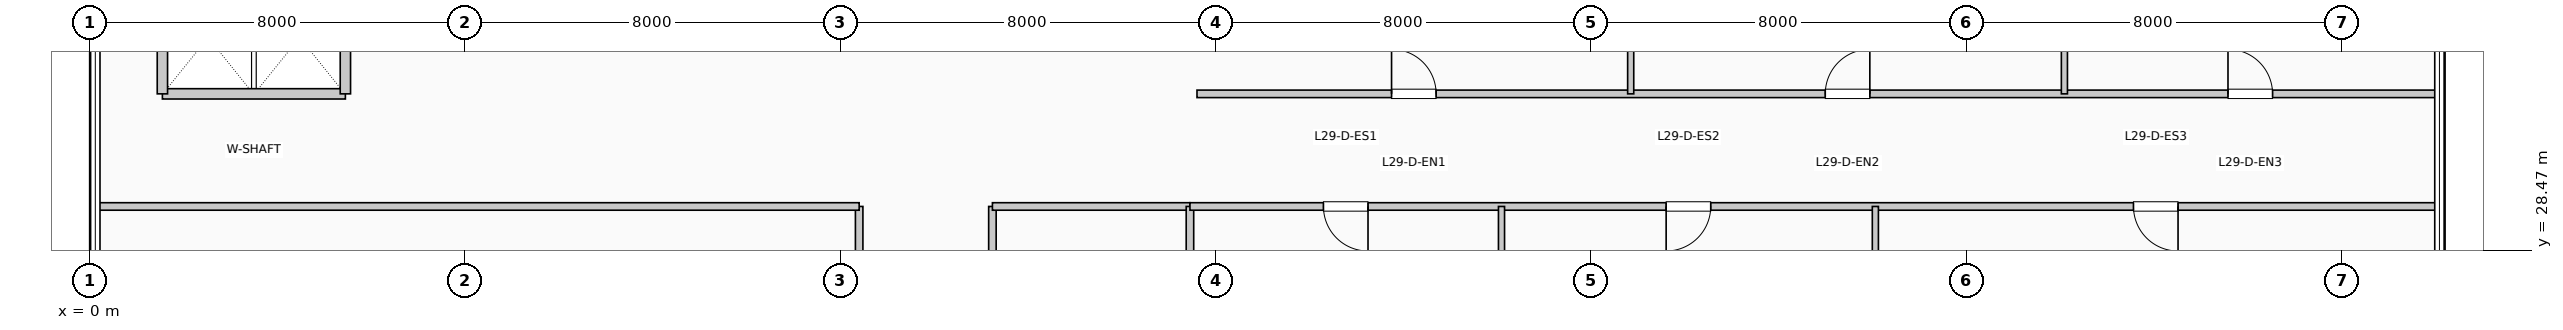
"""IFC4 building model, lengths in metres.
Left out: names, types, materials, properties, quantities, classifications, styles, units other than length and angle.
Written with IfcOpenShell. Run it as: python <this file> out.ifc"""

import sys

from ifc_helpers import new_model, si_unit, direction, frame, frame_2d, origin, place, context, subcontext, project, spatial, rectangle, extrude, element, fill, save


model = new_model("IFC4")
c1 = context("Model", 3, precision=1e-05, world=origin(), true_north=direction((0.0, 1.0)))
c2 = subcontext(c1, "Body", "Model", "MODEL_VIEW")
j1 = project(units=[si_unit("LENGTHUNIT", "METRE"), si_unit("PLANEANGLEUNIT", "RADIAN")], contexts=[c1])
p1 = place(None, origin())
s1 = spatial("IfcSite", under=j1, at=p1, CompositionType="ELEMENT")
p2 = place(p1, origin())
s2 = spatial("IfcBuilding", under=s1, at=p2, CompositionType="ELEMENT")
p3 = place(p2, frame((0.0, 0.0, 122.43)))
s3 = spatial("IfcBuildingStorey", under=s2, at=p3, CompositionType="ELEMENT", Elevation=122.43)
p4 = place(p3, frame((1.55, 31.8, 0.0), z_axis=(0.0, 0.0, 1.0), x_axis=(1.0, 0.0, 0.0)))
e1 = element("IfcWall", 1, at=p4, inside=s3, PredefinedType="PARTITIONING", context=c2, shape_type="SweptSolid", body=[
    extrude(rectangle(XDim=3.9, YDim=0.22, at=frame_2d((1.95, 0.0))), origin(), (0.0, 0.0, 1.0), 3.71),
])
for number, where, z_axis, x_axis in (
    (2, (1.55, 31.8, 0.0), (0.0, 0.0, 1.0), (0.0, 1.0, 0.0)),
    (3, (5.45, 31.8, 0.0), (0.0, 0.0, 1.0), (0.0, 1.0, 0.0)),
):
    element("IfcWall", number, at=place(p3, frame(where, z_axis=z_axis, x_axis=x_axis)), inside=s3, PredefinedType="PARTITIONING", context=c2, shape_type="SweptSolid", body=[
        extrude(rectangle(XDim=2.38, YDim=0.22, at=frame_2d((1.19, 0.0))), origin(), (0.0, 0.0, 1.0), 3.71),
    ])
p5 = place(p3, frame((16.4, 7.2, 0.0), z_axis=(0.0, 0.0, 1.0), x_axis=(0.0, 1.0, 0.0)))
e4 = element("IfcWall", 4, at=p5, inside=s3, PredefinedType="PARTITIONING", context=c2, shape_type="SweptSolid", body=[
    extrude(rectangle(XDim=22.2, YDim=0.16, at=frame_2d((11.1, 0.0))), origin(), (0.0, 0.0, 1.0), 3.71),
])
p6 = place(p5, frame((6.247, 0.0, 0.0), z_axis=(0.0, 0.0, 1.0), x_axis=(-1.0, 0.0, 0.0)))
e5 = element("IfcOpeningElement", 5, at=p6, cuts=e4, PredefinedType="OPENING", context=c2, shape_type="SweptSolid", body=[
    extrude(rectangle(XDim=0.95, YDim=2.15, at=frame_2d((0.475, 1.075))), frame((0.0, 0.09, 0.0), z_axis=(0.0, -1.0, 0.0), x_axis=(1.0, 0.0, 0.0)), (0.0, 0.0, 1.0), 0.18),
])
p7 = place(p5, frame((17.347, 0.0, 0.0), z_axis=(0.0, 0.0, 1.0), x_axis=(-1.0, 0.0, 0.0)))
e6 = element("IfcOpeningElement", 6, at=p7, cuts=e4, PredefinedType="OPENING", context=c2, shape_type="SweptSolid", body=[
    extrude(rectangle(XDim=0.95, YDim=2.15, at=frame_2d((0.475, 1.075))), frame((0.0, 0.09, 0.0), z_axis=(0.0, -1.0, 0.0), x_axis=(1.0, 0.0, 0.0)), (0.0, 0.0, 1.0), 0.18),
])
p8 = place(p3, frame((19.24, 7.2, 0.0), z_axis=(0.0, 0.0, 1.0), x_axis=(0.0, 1.0, 0.0)))
e7 = element("IfcWall", 7, at=p8, inside=s3, PredefinedType="PARTITIONING", context=c2, shape_type="SweptSolid", body=[
    extrude(rectangle(XDim=22.2, YDim=0.16, at=frame_2d((11.1, 0.0))), origin(), (0.0, 0.0, 1.0), 3.71),
])
p9 = place(p8, frame((4.52, 0.0, 0.0)))
e8 = element("IfcOpeningElement", 8, at=p9, cuts=e7, PredefinedType="OPENING", context=c2, shape_type="SweptSolid", body=[
    extrude(rectangle(XDim=0.95, YDim=2.15, at=frame_2d((0.475, 1.075))), frame((0.0, 0.09, 0.0), z_axis=(0.0, -1.0, 0.0), x_axis=(1.0, 0.0, 0.0)), (0.0, 0.0, 1.0), 0.18),
])
p10 = place(p8, frame((15.62, 0.0, 0.0)))
e9 = element("IfcOpeningElement", 9, at=p10, cuts=e7, PredefinedType="OPENING", context=c2, shape_type="SweptSolid", body=[
    extrude(rectangle(XDim=0.95, YDim=2.15, at=frame_2d((0.475, 1.075))), frame((0.0, 0.09, 0.0), z_axis=(0.0, -1.0, 0.0), x_axis=(1.0, 0.0, 0.0)), (0.0, 0.0, 1.0), 0.18),
])
p11 = place(p3, frame((0.19, 29.4, 0.0), z_axis=(0.0, 0.0, 1.0), x_axis=(1.0, 0.0, 0.0)))
e10 = element("IfcWall", 10, at=p11, inside=s3, PredefinedType="PARTITIONING", context=c2, shape_type="SweptSolid", body=[
    extrude(rectangle(XDim=16.21, YDim=0.16, at=frame_2d((8.105, 0.0))), origin(), (0.0, 0.0, 1.0), 3.365),
])
p12 = place(p3, frame((19.24, 29.4, 0.0), z_axis=(0.0, 0.0, 1.0), x_axis=(1.0, 0.0, 0.0)))
e11 = element("IfcWall", 11, at=p12, inside=s3, PredefinedType="PARTITIONING", context=c2, shape_type="SweptSolid", body=[
    extrude(rectangle(XDim=4.21, YDim=0.16, at=frame_2d((2.105, 0.0))), origin(), (0.0, 0.0, 1.0), 3.71),
])
p13 = place(p3, frame((23.45, 0.19, 0.0), z_axis=(0.0, 0.0, 1.0), x_axis=(0.0, 1.0, 0.0)))
e12 = element("IfcWall", 12, at=p13, inside=s3, PredefinedType="PARTITIONING", context=c2, shape_type="SweptSolid", body=[
    extrude(rectangle(XDim=29.21, YDim=0.16, at=frame_2d((14.605, 0.0))), origin(), (0.0, 0.0, 1.0), 3.045),
])
p14 = place(p3, frame((23.45, 29.4, 0.0), z_axis=(0.0, 0.0, 1.0), x_axis=(1.0, 0.0, 0.0)))
e13 = element("IfcWall", 13, at=p14, inside=s3, PredefinedType="PARTITIONING", context=c2, shape_type="SweptSolid", body=[
    extrude(rectangle(XDim=26.56, YDim=0.16, at=frame_2d((13.28, 0.0))), origin(), (0.0, 0.0, 1.0), 3.365),
])
p15 = place(p14, frame((3.795, 0.0, 0.0), z_axis=(0.0, 0.0, 1.0), x_axis=(-1.0, 0.0, 0.0)))
e14 = element("IfcOpeningElement", 14, at=p15, cuts=e13, PredefinedType="OPENING", context=c2, shape_type="SweptSolid", body=[
    extrude(rectangle(XDim=0.95, YDim=2.15, at=frame_2d((0.475, 1.075))), frame((0.0, 0.09, 0.0), z_axis=(0.0, -1.0, 0.0), x_axis=(1.0, 0.0, 0.0)), (0.0, 0.0, 1.0), 0.18),
])
p16 = place(p14, frame((11.099, 0.0, 0.0), z_axis=(0.0, 0.0, 1.0), x_axis=(-1.0, 0.0, 0.0)))
e15 = element("IfcOpeningElement", 15, at=p16, cuts=e13, PredefinedType="OPENING", context=c2, shape_type="SweptSolid", body=[
    extrude(rectangle(XDim=0.95, YDim=2.15, at=frame_2d((0.475, 1.075))), frame((0.0, 0.09, 0.0), z_axis=(0.0, -1.0, 0.0), x_axis=(1.0, 0.0, 0.0)), (0.0, 0.0, 1.0), 0.18),
])
p17 = place(p14, frame((21.059, 0.0, 0.0), z_axis=(0.0, 0.0, 1.0), x_axis=(-1.0, 0.0, 0.0)))
e16 = element("IfcOpeningElement", 16, at=p17, cuts=e13, PredefinedType="OPENING", context=c2, shape_type="SweptSolid", body=[
    extrude(rectangle(XDim=0.95, YDim=2.15, at=frame_2d((0.475, 1.075))), frame((0.0, 0.09, 0.0), z_axis=(0.0, -1.0, 0.0), x_axis=(1.0, 0.0, 0.0)), (0.0, 0.0, 1.0), 0.18),
])
p18 = place(p3, frame((23.6, 31.8, 0.0), z_axis=(0.0, 0.0, 1.0), x_axis=(1.0, 0.0, 0.0)))
e17 = element("IfcWall", 17, at=p18, inside=s3, PredefinedType="PARTITIONING", context=c2, shape_type="SweptSolid", body=[
    extrude(rectangle(XDim=26.41, YDim=0.16, at=frame_2d((13.205, 0.0))), origin(), (0.0, 0.0, 1.0), 3.71),
])
p19 = place(p18, frame((4.147, 0.0, 0.0)))
e18 = element("IfcOpeningElement", 18, at=p19, cuts=e17, PredefinedType="OPENING", context=c2, shape_type="SweptSolid", body=[
    extrude(rectangle(XDim=0.95, YDim=2.15, at=frame_2d((0.475, 1.075))), frame((0.0, 0.09, 0.0), z_axis=(0.0, -1.0, 0.0), x_axis=(1.0, 0.0, 0.0)), (0.0, 0.0, 1.0), 0.18),
])
p20 = place(p18, frame((13.39, 0.0, 0.0)))
e19 = element("IfcOpeningElement", 19, at=p20, cuts=e17, PredefinedType="OPENING", context=c2, shape_type="SweptSolid", body=[
    extrude(rectangle(XDim=0.95, YDim=2.15, at=frame_2d((0.475, 1.075))), frame((0.0, 0.09, 0.0), z_axis=(0.0, -1.0, 0.0), x_axis=(1.0, 0.0, 0.0)), (0.0, 0.0, 1.0), 0.18),
])
p21 = place(p18, frame((21.973, 0.0, 0.0)))
e20 = element("IfcOpeningElement", 20, at=p21, cuts=e17, PredefinedType="OPENING", context=c2, shape_type="SweptSolid", body=[
    extrude(rectangle(XDim=0.95, YDim=2.15, at=frame_2d((0.475, 1.075))), frame((0.0, 0.09, 0.0), z_axis=(0.0, -1.0, 0.0), x_axis=(1.0, 0.0, 0.0)), (0.0, 0.0, 1.0), 0.18),
])
for number, where, z_axis, x_axis in (
    (21, (30.09, 22.19, 0.0), (0.0, 0.0, 1.0), (0.0, 1.0, 0.0)),
    (22, (38.058, 22.19, 0.0), (0.0, 0.0, 1.0), (0.0, 1.0, 0.0)),
):
    element("IfcWall", number, at=place(p3, frame(where, z_axis=z_axis, x_axis=x_axis)), inside=s3, PredefinedType="PARTITIONING", context=c2, shape_type="SweptSolid", body=[
        extrude(rectangle(XDim=7.21, YDim=0.13, at=frame_2d((3.605, 0.0))), origin(), (0.0, 0.0, 1.0), 3.71),
    ])
for number, where, z_axis, x_axis in (
    (23, (32.844, 31.8, 0.0), (0.0, 0.0, 1.0), (0.0, 1.0, 0.0)),
    (24, (42.087, 31.8, 0.0), (0.0, 0.0, 1.0), (0.0, 1.0, 0.0)),
):
    element("IfcWall", number, at=place(p3, frame(where, z_axis=z_axis, x_axis=x_axis)), inside=s3, PredefinedType="PARTITIONING", context=c2, shape_type="SweptSolid", body=[
        extrude(rectangle(XDim=14.01, YDim=0.13, at=frame_2d((7.005, 0.0))), origin(), (0.0, 0.0, 1.0), 3.71),
    ])
p22 = place(p15, origin())
e25 = element("IfcDoor", 25, at=p22, inside=s3, OperationType="SINGLE_SWING_RIGHT", PredefinedType="DOOR", context=c2, shape_type="SweptSolid", body=[
    extrude(rectangle(XDim=0.95, YDim=2.15, at=frame_2d((0.475, 1.075))), frame((0.0, 0.025, 0.0), z_axis=(0.0, -1.0, 0.0), x_axis=(1.0, 0.0, 0.0)), (0.0, 0.0, 1.0), 0.05),
])
fill(e14, e25)
p23 = place(p16, origin())
e26 = element("IfcDoor", 26, at=p23, inside=s3, OperationType="SINGLE_SWING_LEFT", PredefinedType="DOOR", context=c2, shape_type="SweptSolid", body=[
    extrude(rectangle(XDim=0.95, YDim=2.15, at=frame_2d((0.475, 1.075))), frame((0.0, 0.025, 0.0), z_axis=(0.0, -1.0, 0.0), x_axis=(1.0, 0.0, 0.0)), (0.0, 0.0, 1.0), 0.05),
])
fill(e15, e26)
p24 = place(p17, origin())
e27 = element("IfcDoor", 27, at=p24, inside=s3, OperationType="SINGLE_SWING_RIGHT", PredefinedType="DOOR", context=c2, shape_type="SweptSolid", body=[
    extrude(rectangle(XDim=0.95, YDim=2.15, at=frame_2d((0.475, 1.075))), frame((0.0, 0.025, 0.0), z_axis=(0.0, -1.0, 0.0), x_axis=(1.0, 0.0, 0.0)), (0.0, 0.0, 1.0), 0.05),
])
fill(e16, e27)
p25 = place(p19, origin())
e28 = element("IfcDoor", 28, at=p25, inside=s3, OperationType="SINGLE_SWING_LEFT", PredefinedType="DOOR", context=c2, shape_type="SweptSolid", body=[
    extrude(rectangle(XDim=0.95, YDim=2.15, at=frame_2d((0.475, 1.075))), frame((0.0, 0.025, 0.0), z_axis=(0.0, -1.0, 0.0), x_axis=(1.0, 0.0, 0.0)), (0.0, 0.0, 1.0), 0.05),
])
fill(e18, e28)
p26 = place(p20, origin())
e29 = element("IfcDoor", 29, at=p26, inside=s3, OperationType="SINGLE_SWING_RIGHT", PredefinedType="DOOR", context=c2, shape_type="SweptSolid", body=[
    extrude(rectangle(XDim=0.95, YDim=2.15, at=frame_2d((0.475, 1.075))), frame((0.0, 0.025, 0.0), z_axis=(0.0, -1.0, 0.0), x_axis=(1.0, 0.0, 0.0)), (0.0, 0.0, 1.0), 0.05),
])
fill(e19, e29)
p27 = place(p21, origin())
e30 = element("IfcDoor", 30, at=p27, inside=s3, OperationType="SINGLE_SWING_LEFT", PredefinedType="DOOR", context=c2, shape_type="SweptSolid", body=[
    extrude(rectangle(XDim=0.95, YDim=2.15, at=frame_2d((0.475, 1.075))), frame((0.0, 0.025, 0.0), z_axis=(0.0, -1.0, 0.0), x_axis=(1.0, 0.0, 0.0)), (0.0, 0.0, 1.0), 0.05),
])
fill(e20, e30)
save(model, sys.argv[1])
